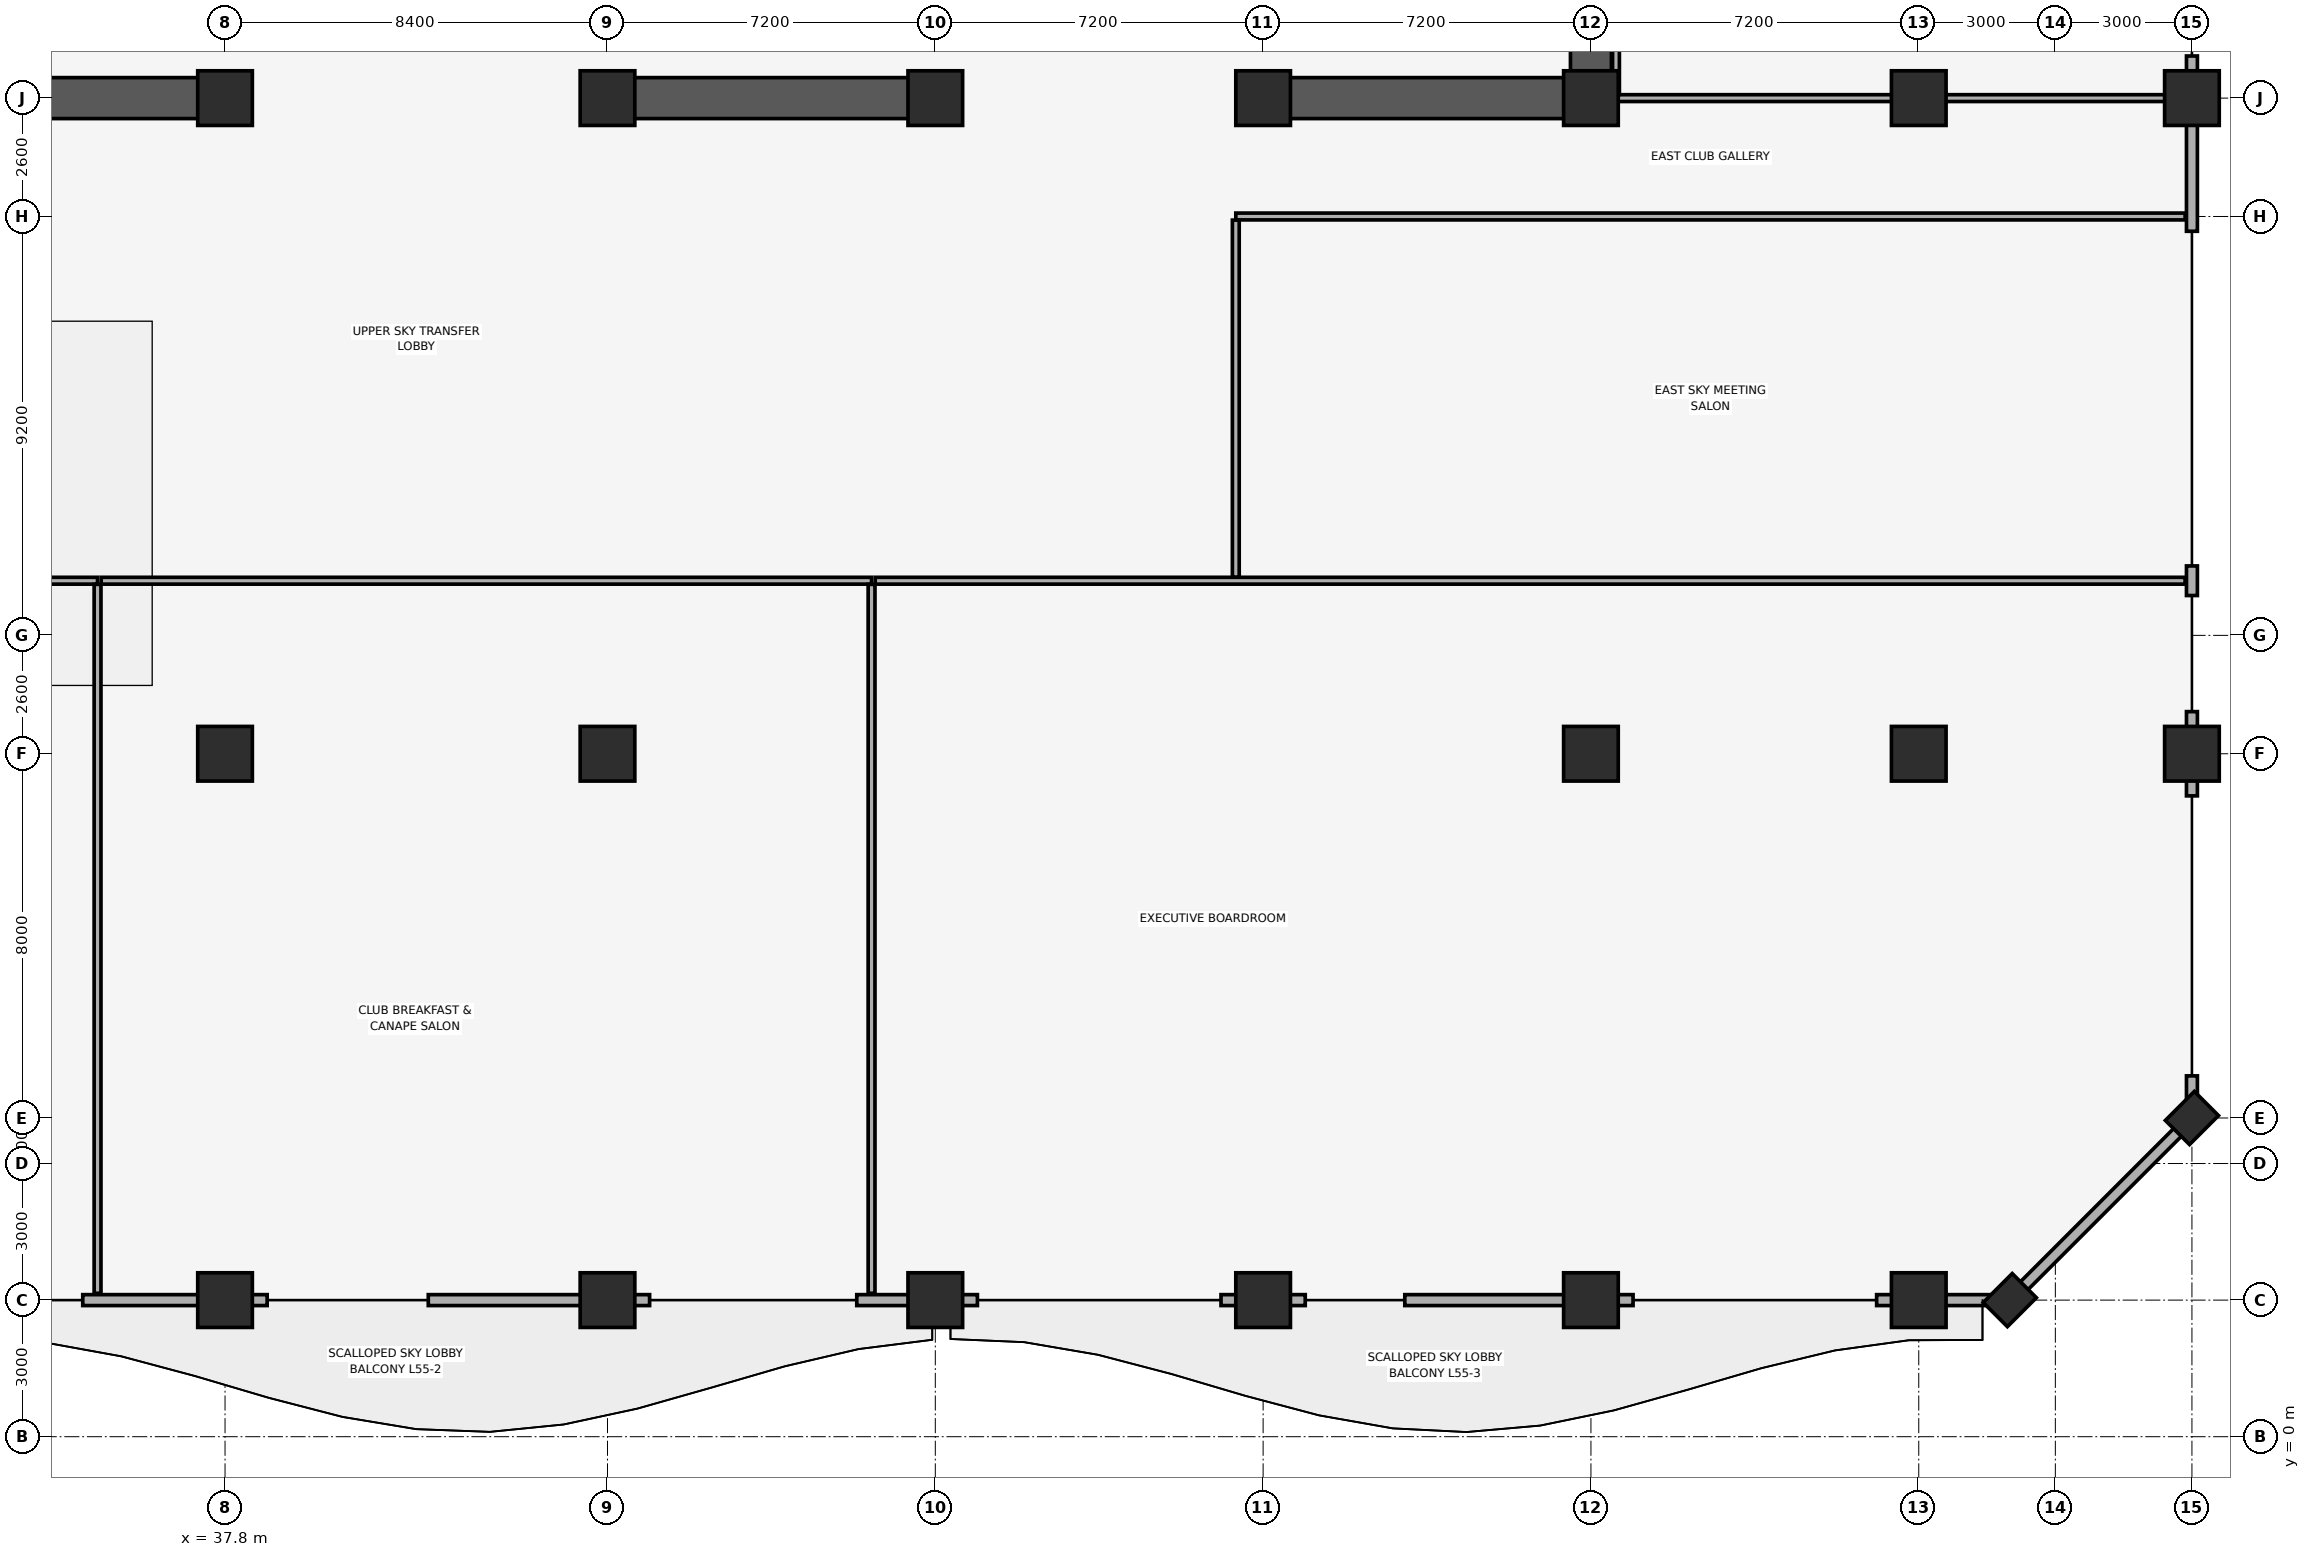
"""IFC4 building model, lengths in metres.
Left out: names, types, materials, properties, quantities, classifications, styles, units other than length and angle.
Written with IfcOpenShell. Run it as: python <this file> out.ifc"""

import sys

from ifc_helpers import new_model, si_unit, direction, frame, frame_2d, origin, origin_2d, place, context, subcontext, project, spatial, rectangle, extrude, element, fill, save


model = new_model("IFC4")
c1 = context("Model", 3, precision=1e-05, world=origin(), true_north=direction((0.0, 1.0)))
c2 = subcontext(c1, "Body", "Model", "MODEL_VIEW")
j1 = project(units=[si_unit("LENGTHUNIT", "METRE"), si_unit("PLANEANGLEUNIT", "RADIAN")], contexts=[c1])
p1 = place(None, origin())
s1 = spatial("IfcSite", under=j1, at=p1, CompositionType="ELEMENT")
p2 = place(p1, origin())
s2 = spatial("IfcBuilding", under=s1, at=p2, CompositionType="ELEMENT")
p3 = place(p2, frame((0.0, 0.0, 224.35)))
s3 = spatial("IfcBuildingStorey", under=s2, at=p3, CompositionType="ELEMENT", Elevation=224.35)
for number, where, z_axis, x_axis in (
    (1, (37.8, 3.0, 0.0), (0.0, 0.0, 1.0), (1.0, 0.0, 0.0)),
    (2, (46.2, 3.0, 0.0), (0.0, 0.0, 1.0), (1.0, 0.0, 0.0)),
    (3, (53.4, 3.0, 0.0), (0.0, 0.0, 1.0), (1.0, 0.0, 0.0)),
    (4, (60.6, 3.0, 0.0), (0.0, 0.0, 1.0), (1.0, 0.0, 0.0)),
    (5, (67.8, 3.0, 0.0), (0.0, 0.0, 1.0), (1.0, 0.0, 0.0)),
    (6, (75.0, 3.0, 0.0), (0.0, 0.0, 1.0), (1.0, 0.0, 0.0)),
    (7, (81.0, 15.0, 0.0), (0.0, 0.0, 1.0), (1.0, 0.0, 0.0)),
    (8, (81.0, 29.4, 0.0), (0.0, 0.0, 1.0), (1.0, 0.0, 0.0)),
):
    element("IfcColumn", number, at=place(p3, frame(where, z_axis=z_axis, x_axis=x_axis)), inside=s3, PredefinedType="COLUMN", context=c2, shape_type="SweptSolid", body=[
        extrude(rectangle(XDim=1.2, YDim=1.2, at=origin_2d()), origin(), (0.0, 0.0, 1.0), 4.56),
    ])
for number, where, z_axis, x_axis in (
    (9, (77.0, 3.0, 0.0), (0.0, 0.0, 1.0), (0.707, 0.707, 0.0)),
    (10, (81.0, 7.0, 0.0), (0.0, 0.0, 1.0), (0.707, 0.707, 0.0)),
):
    element("IfcColumn", number, at=place(p3, frame(where, z_axis=z_axis, x_axis=x_axis)), inside=s3, PredefinedType="PILASTER", context=c2, shape_type="SweptSolid", body=[
        extrude(rectangle(XDim=0.9, YDim=0.75, at=origin_2d()), origin(), (0.0, 0.0, 1.0), 4.56),
    ])
for number, where, z_axis, x_axis in (
    (11, (37.8, 15.0, 0.0), (0.0, 0.0, 1.0), (1.0, 0.0, 0.0)),
    (12, (46.2, 15.0, 0.0), (0.0, 0.0, 1.0), (1.0, 0.0, 0.0)),
    (13, (67.8, 15.0, 0.0), (0.0, 0.0, 1.0), (1.0, 0.0, 0.0)),
    (14, (75.0, 15.0, 0.0), (0.0, 0.0, 1.0), (1.0, 0.0, 0.0)),
    (15, (37.8, 29.4, 0.0), (0.0, 0.0, 1.0), (1.0, 0.0, 0.0)),
    (16, (46.2, 29.4, 0.0), (0.0, 0.0, 1.0), (1.0, 0.0, 0.0)),
    (17, (53.4, 29.4, 0.0), (0.0, 0.0, 1.0), (1.0, 0.0, 0.0)),
    (18, (60.6, 29.4, 0.0), (0.0, 0.0, 1.0), (1.0, 0.0, 0.0)),
    (19, (67.8, 29.4, 0.0), (0.0, 0.0, 1.0), (1.0, 0.0, 0.0)),
    (20, (75.0, 29.4, 0.0), (0.0, 0.0, 1.0), (1.0, 0.0, 0.0)),
):
    element("IfcColumn", number, at=place(p3, frame(where, z_axis=z_axis, x_axis=x_axis)), inside=s3, PredefinedType="COLUMN", context=c2, shape_type="SweptSolid", body=[
        extrude(rectangle(XDim=1.2, YDim=1.2, at=origin_2d()), origin(), (0.0, 0.0, 1.0), 4.56),
    ])
p4 = place(p3, frame((34.675, 3.0, 0.0), z_axis=(0.0, 0.0, 1.0), x_axis=(1.0, 0.0, 0.0)))
e21 = element("IfcWall", 21, at=p4, inside=s3, PredefinedType="SOLIDWALL", context=c2, shape_type="SweptSolid", body=[
    extrude(rectangle(XDim=4.05, YDim=0.24, at=frame_2d((2.025, 0.0))), origin(), (0.0, 0.0, 1.0), 3.4),
])
p5 = place(p3, frame((42.264, 3.0, 0.0), z_axis=(0.0, 0.0, 1.0), x_axis=(1.0, 0.0, 0.0)))
e22 = element("IfcWall", 22, at=p5, inside=s3, PredefinedType="SOLIDWALL", context=c2, shape_type="SweptSolid", body=[
    extrude(rectangle(XDim=4.861, YDim=0.24, at=frame_2d((2.431, 0.0))), origin(), (0.0, 0.0, 1.0), 3.4),
])
p6 = place(p5, frame((0.805, 0.0, 0.0)))
e23 = element("IfcOpeningElement", 23, at=p6, cuts=e22, PredefinedType="OPENING", context=c2, shape_type="SweptSolid", body=[
    extrude(rectangle(XDim=1.1, YDim=2.15, at=frame_2d((0.55, 1.075))), frame((0.0, 0.13, 0.0), z_axis=(0.0, -1.0, 0.0), x_axis=(1.0, 0.0, 0.0)), (0.0, 0.0, 1.0), 0.26),
])
p7 = place(p3, frame((51.675, 3.0, 0.0), z_axis=(0.0, 0.0, 1.0), x_axis=(1.0, 0.0, 0.0)))
e24 = element("IfcWall", 24, at=p7, inside=s3, PredefinedType="SOLIDWALL", context=c2, shape_type="SweptSolid", body=[
    extrude(rectangle(XDim=2.65, YDim=0.24, at=frame_2d((1.325, 0.0))), origin(), (0.0, 0.0, 1.0), 3.4),
])
p8 = place(p3, frame((59.675, 3.0, 0.0), z_axis=(0.0, 0.0, 1.0), x_axis=(1.0, 0.0, 0.0)))
e25 = element("IfcWall", 25, at=p8, inside=s3, PredefinedType="SOLIDWALL", context=c2, shape_type="SweptSolid", body=[
    extrude(rectangle(XDim=1.85, YDim=0.24, at=frame_2d((0.925, 0.0))), origin(), (0.0, 0.0, 1.0), 4.52),
])
p9 = place(p3, frame((63.712, 3.0, 0.0), z_axis=(0.0, 0.0, 1.0), x_axis=(1.0, 0.0, 0.0)))
e26 = element("IfcWall", 26, at=p9, inside=s3, PredefinedType="SOLIDWALL", context=c2, shape_type="SweptSolid", body=[
    extrude(rectangle(XDim=5.013, YDim=0.24, at=frame_2d((2.507, 0.0))), origin(), (0.0, 0.0, 1.0), 3.4),
])
p10 = place(p9, frame((0.805, 0.0, 0.0)))
e27 = element("IfcOpeningElement", 27, at=p10, cuts=e26, PredefinedType="OPENING", context=c2, shape_type="SweptSolid", body=[
    extrude(rectangle(XDim=1.1, YDim=2.15, at=frame_2d((0.55, 1.075))), frame((0.0, 0.13, 0.0), z_axis=(0.0, -1.0, 0.0), x_axis=(1.0, 0.0, 0.0)), (0.0, 0.0, 1.0), 0.26),
])
p11 = place(p3, frame((74.075, 3.0, 0.0), z_axis=(0.0, 0.0, 1.0), x_axis=(1.0, 0.0, 0.0)))
e28 = element("IfcWall", 28, at=p11, inside=s3, PredefinedType="SOLIDWALL", context=c2, shape_type="SweptSolid", body=[
    extrude(rectangle(XDim=2.925, YDim=0.24, at=frame_2d((1.462, 0.0))), origin(), (0.0, 0.0, 1.0), 4.52),
])
p12 = place(p3, frame((77.0, 3.0, 0.0), z_axis=(0.0, 0.0, 1.0), x_axis=(0.707106781187, 0.707106781187, 0.0)))
e29 = element("IfcWall", 29, at=p12, inside=s3, PredefinedType="SOLIDWALL", context=c2, shape_type="SweptSolid", body=[
    extrude(rectangle(XDim=5.657, YDim=0.24, at=frame_2d((2.828, 0.0))), origin(), (0.0, 0.0, 1.0), 4.52),
])
p13 = place(p12, frame((1.778, 0.0, 0.85)))
e30 = element("IfcOpeningElement", 30, at=p13, cuts=e29, PredefinedType="OPENING", context=c2, shape_type="SweptSolid", body=[
    extrude(rectangle(XDim=2.1, YDim=1.6, at=frame_2d((1.05, 0.8))), frame((0.0, 0.13, 0.0), z_axis=(0.0, -1.0, 0.0), x_axis=(1.0, 0.0, 0.0)), (0.0, 0.0, 1.0), 0.26),
])
p14 = place(p3, frame((81.0, 7.0, 0.0), z_axis=(0.0, 0.0, 1.0), x_axis=(0.0, 1.0, 0.0)))
e31 = element("IfcWall", 31, at=p14, inside=s3, PredefinedType="SOLIDWALL", context=c2, shape_type="SweptSolid", body=[
    extrude(rectangle(XDim=0.925, YDim=0.24, at=frame_2d((0.462, 0.0))), origin(), (0.0, 0.0, 1.0), 4.52),
])
p15 = place(p3, frame((81.0, 14.075, 0.0), z_axis=(0.0, 0.0, 1.0), x_axis=(0.0, 1.0, 0.0)))
e32 = element("IfcWall", 32, at=p15, inside=s3, PredefinedType="SOLIDWALL", context=c2, shape_type="SweptSolid", body=[
    extrude(rectangle(XDim=1.85, YDim=0.24, at=frame_2d((0.925, 0.0))), origin(), (0.0, 0.0, 1.0), 4.52),
])
p16 = place(p3, frame((81.0, 18.475, 0.0), z_axis=(0.0, 0.0, 1.0), x_axis=(0.0, 1.0, 0.0)))
e33 = element("IfcWall", 33, at=p16, inside=s3, PredefinedType="SOLIDWALL", context=c2, shape_type="SweptSolid", body=[
    extrude(rectangle(XDim=0.65, YDim=0.24, at=frame_2d((0.325, 0.0))), origin(), (0.0, 0.0, 1.0), 4.52),
])
p17 = place(p3, frame((81.0, 26.475, 0.0), z_axis=(0.0, 0.0, 1.0), x_axis=(0.0, 1.0, 0.0)))
e34 = element("IfcWall", 34, at=p17, inside=s3, PredefinedType="SOLIDWALL", context=c2, shape_type="SweptSolid", body=[
    extrude(rectangle(XDim=3.85, YDim=0.24, at=frame_2d((1.925, 0.0))), origin(), (0.0, 0.0, 1.0), 4.52),
])
p18 = place(p3, frame((67.8, 29.4, 0.0), z_axis=(0.0, 0.0, 1.0), x_axis=(0.0, 1.0, 0.0)))
e35 = element("IfcWall", 35, at=p18, inside=s3, PredefinedType="SHEAR", context=c2, shape_type="SweptSolid", body=[
    extrude(rectangle(XDim=19.2, YDim=0.9, at=frame_2d((9.6, 0.0))), origin(), (0.0, 0.0, 1.0), 4.52),
])
for number, where, z_axis, x_axis in (
    (36, (30.4, 29.4, 0.0), (0.0, 0.0, 1.0), (1.0, 0.0, 0.0)),
    (37, (46.0, 29.4, 0.0), (0.0, 0.0, 1.0), (1.0, 0.0, 0.0)),
):
    element("IfcWall", number, at=place(p3, frame(where, z_axis=z_axis, x_axis=x_axis)), inside=s3, PredefinedType="SHEAR", context=c2, shape_type="SweptSolid", body=[
        extrude(rectangle(XDim=7.6, YDim=0.9, at=frame_2d((3.8, 0.0))), origin(), (0.0, 0.0, 1.0), 4.52),
    ])
p19 = place(p3, frame((60.4, 29.4, 0.0), z_axis=(0.0, 0.0, 1.0), x_axis=(1.0, 0.0, 0.0)))
e38 = element("IfcWall", 38, at=p19, inside=s3, PredefinedType="SHEAR", context=c2, shape_type="SweptSolid", body=[
    extrude(rectangle(XDim=6.945, YDim=0.9, at=frame_2d((3.473, 0.0))), origin(), (0.0, 0.0, 1.0), 4.52),
])
p20 = place(p3, frame((3.15, 18.8, 0.0), z_axis=(0.0, 0.0, 1.0), x_axis=(1.0, 0.0, 0.0)))
e39 = element("IfcWall", 39, at=p20, inside=s3, PredefinedType="PARTITIONING", context=c2, shape_type="SweptSolid", body=[
    extrude(rectangle(XDim=31.85, YDim=0.15, at=frame_2d((15.925, 0.0))), origin(), (0.0, 0.0, 1.0), 4.52),
])
p21 = place(p20, frame((25.1, 0.0, 0.0)))
e40 = element("IfcOpeningElement", 40, at=p21, cuts=e39, PredefinedType="OPENING", context=c2, shape_type="SweptSolid", body=[
    extrude(rectangle(XDim=1.5, YDim=2.25, at=frame_2d((0.75, 1.125))), frame((0.0, 0.085, 0.0), z_axis=(0.0, -1.0, 0.0), x_axis=(1.0, 0.0, 0.0)), (0.0, 0.0, 1.0), 0.17),
])
p22 = place(p3, frame((35.0, 3.15, 0.0), z_axis=(0.0, 0.0, 1.0), x_axis=(0.0, 1.0, 0.0)))
e41 = element("IfcWall", 41, at=p22, inside=s3, PredefinedType="PARTITIONING", context=c2, shape_type="SweptSolid", body=[
    extrude(rectangle(XDim=15.57, YDim=0.15, at=frame_2d((7.785, 0.0))), origin(), (0.0, 0.0, 1.0), 4.52),
])
p23 = place(p3, frame((35.08, 18.8, 0.0), z_axis=(0.0, 0.0, 1.0), x_axis=(1.0, 0.0, 0.0)))
e42 = element("IfcWall", 42, at=p23, inside=s3, PredefinedType="PARTITIONING", context=c2, shape_type="SweptSolid", body=[
    extrude(rectangle(XDim=16.92, YDim=0.15, at=frame_2d((8.46, 0.0))), origin(), (0.0, 0.0, 1.0), 4.52),
])
p24 = place(p23, frame((6.17, 0.0, 0.0)))
e43 = element("IfcOpeningElement", 43, at=p24, cuts=e42, PredefinedType="OPENING", context=c2, shape_type="SweptSolid", body=[
    extrude(rectangle(XDim=1.5, YDim=2.25, at=frame_2d((0.75, 1.125))), frame((0.0, 0.085, 0.0), z_axis=(0.0, -1.0, 0.0), x_axis=(1.0, 0.0, 0.0)), (0.0, 0.0, 1.0), 0.17),
])
p25 = place(p3, frame((52.0, 3.15, 0.0), z_axis=(0.0, 0.0, 1.0), x_axis=(0.0, 1.0, 0.0)))
e44 = element("IfcWall", 44, at=p25, inside=s3, PredefinedType="PARTITIONING", context=c2, shape_type="SweptSolid", body=[
    extrude(rectangle(XDim=15.57, YDim=0.15, at=frame_2d((7.785, 0.0))), origin(), (0.0, 0.0, 1.0), 4.52),
])
p26 = place(p3, frame((52.08, 18.8, 0.0), z_axis=(0.0, 0.0, 1.0), x_axis=(1.0, 0.0, 0.0)))
e45 = element("IfcWall", 45, at=p26, inside=s3, PredefinedType="PARTITIONING", context=c2, shape_type="SweptSolid", body=[
    extrude(rectangle(XDim=28.77, YDim=0.15, at=frame_2d((14.385, 0.0))), origin(), (0.0, 0.0, 1.0), 4.52),
])
p27 = place(p26, frame((2.67, 0.0, 0.0)))
e46 = element("IfcOpeningElement", 46, at=p27, cuts=e45, PredefinedType="OPENING", context=c2, shape_type="SweptSolid", body=[
    extrude(rectangle(XDim=1.5, YDim=2.25, at=frame_2d((0.75, 1.125))), frame((0.0, 0.085, 0.0), z_axis=(0.0, -1.0, 0.0), x_axis=(1.0, 0.0, 0.0)), (0.0, 0.0, 1.0), 0.17),
])
p28 = place(p3, frame((60.0, 26.8, 0.0), z_axis=(0.0, 0.0, 1.0), x_axis=(1.0, 0.0, 0.0)))
e47 = element("IfcWall", 47, at=p28, inside=s3, PredefinedType="PARTITIONING", context=c2, shape_type="SweptSolid", body=[
    extrude(rectangle(XDim=20.85, YDim=0.15, at=frame_2d((10.425, 0.0))), origin(), (0.0, 0.0, 1.0), 4.52),
])
p29 = place(p28, frame((4.5, 0.0, 0.0)))
e48 = element("IfcOpeningElement", 48, at=p29, cuts=e47, PredefinedType="OPENING", context=c2, shape_type="SweptSolid", body=[
    extrude(rectangle(XDim=1.0, YDim=2.15, at=frame_2d((0.5, 1.075))), frame((0.0, 0.085, 0.0), z_axis=(0.0, -1.0, 0.0), x_axis=(1.0, 0.0, 0.0)), (0.0, 0.0, 1.0), 0.17),
])
p30 = place(p3, frame((60.0, 18.88, 0.0), z_axis=(0.0, 0.0, 1.0), x_axis=(0.0, 1.0, 0.0)))
e49 = element("IfcWall", 49, at=p30, inside=s3, PredefinedType="PARTITIONING", context=c2, shape_type="SweptSolid", body=[
    extrude(rectangle(XDim=7.84, YDim=0.15, at=frame_2d((3.92, 0.0))), origin(), (0.0, 0.0, 1.0), 4.52),
])
p31 = place(p3, frame((68.35, 29.4, 0.0), z_axis=(0.0, 0.0, 1.0), x_axis=(1.0, 0.0, 0.0)))
e50 = element("IfcWall", 50, at=p31, inside=s3, PredefinedType="PARTITIONING", context=c2, shape_type="SweptSolid", body=[
    extrude(rectangle(XDim=12.5, YDim=0.15, at=frame_2d((6.25, 0.0))), origin(), (0.0, 0.0, 1.0), 3.4),
])
p32 = place(p31, frame((2.3, 0.0, 0.0)))
e51 = element("IfcOpeningElement", 51, at=p32, cuts=e50, PredefinedType="OPENING", context=c2, shape_type="SweptSolid", body=[
    extrude(rectangle(XDim=1.5, YDim=2.25, at=frame_2d((0.75, 1.125))), frame((0.0, 0.085, 0.0), z_axis=(0.0, -1.0, 0.0), x_axis=(1.0, 0.0, 0.0)), (0.0, 0.0, 1.0), 0.17),
])
p33 = place(p3, frame((68.35, 29.48, 0.0), z_axis=(0.0, 0.0, 1.0), x_axis=(0.0, 1.0, 0.0)))
e52 = element("IfcWall", 52, at=p33, inside=s3, PredefinedType="PARTITIONING", context=c2, shape_type="SweptSolid", body=[
    extrude(rectangle(XDim=19.37, YDim=0.15, at=frame_2d((9.685, 0.0))), origin(), (0.0, 0.0, 1.0), 4.52),
])
p34 = place(p13, origin())
e53 = element("IfcWindow", 53, at=p34, inside=s3, PartitioningType="SINGLE_PANEL", PredefinedType="WINDOW", context=c2, shape_type="SweptSolid", body=[
    extrude(rectangle(XDim=2.1, YDim=1.6, at=frame_2d((1.05, 0.8))), frame((0.0, 0.03, 0.0), z_axis=(0.0, -1.0, 0.0), x_axis=(1.0, 0.0, 0.0)), (0.0, 0.0, 1.0), 0.06),
])
fill(e30, e53)
p35 = place(p6, origin())
e54 = element("IfcDoor", 54, at=p35, inside=s3, OperationType="SINGLE_SWING_LEFT", PredefinedType="DOOR", context=c2, shape_type="SweptSolid", body=[
    extrude(rectangle(XDim=1.1, YDim=2.15, at=frame_2d((0.55, 1.075))), frame((0.0, 0.025, 0.0), z_axis=(0.0, -1.0, 0.0), x_axis=(1.0, 0.0, 0.0)), (0.0, 0.0, 1.0), 0.05),
])
fill(e23, e54)
p36 = place(p10, origin())
e55 = element("IfcDoor", 55, at=p36, inside=s3, OperationType="SINGLE_SWING_RIGHT", PredefinedType="DOOR", context=c2, shape_type="SweptSolid", body=[
    extrude(rectangle(XDim=1.1, YDim=2.15, at=frame_2d((0.55, 1.075))), frame((0.0, 0.025, 0.0), z_axis=(0.0, -1.0, 0.0), x_axis=(1.0, 0.0, 0.0)), (0.0, 0.0, 1.0), 0.05),
])
fill(e27, e55)
p37 = place(p24, origin())
e56 = element("IfcDoor", 56, at=p37, inside=s3, OperationType="DOUBLE_DOOR_SINGLE_SWING", PredefinedType="DOOR", context=c2, shape_type="SweptSolid", body=[
    extrude(rectangle(XDim=1.5, YDim=2.25, at=frame_2d((0.75, 1.125))), frame((0.0, 0.025, 0.0), z_axis=(0.0, -1.0, 0.0), x_axis=(1.0, 0.0, 0.0)), (0.0, 0.0, 1.0), 0.05),
])
fill(e43, e56)
p38 = place(p27, origin())
e57 = element("IfcDoor", 57, at=p38, inside=s3, OperationType="DOUBLE_DOOR_SINGLE_SWING", PredefinedType="DOOR", context=c2, shape_type="SweptSolid", body=[
    extrude(rectangle(XDim=1.5, YDim=2.25, at=frame_2d((0.75, 1.125))), frame((0.0, 0.025, 0.0), z_axis=(0.0, -1.0, 0.0), x_axis=(1.0, 0.0, 0.0)), (0.0, 0.0, 1.0), 0.05),
])
fill(e46, e57)
p39 = place(p29, origin())
e58 = element("IfcDoor", 58, at=p39, inside=s3, OperationType="SINGLE_SWING_RIGHT", PredefinedType="DOOR", context=c2, shape_type="SweptSolid", body=[
    extrude(rectangle(XDim=1.0, YDim=2.15, at=frame_2d((0.5, 1.075))), frame((0.0, 0.025, 0.0), z_axis=(0.0, -1.0, 0.0), x_axis=(1.0, 0.0, 0.0)), (0.0, 0.0, 1.0), 0.05),
])
fill(e48, e58)
p40 = place(p32, origin())
e59 = element("IfcDoor", 59, at=p40, inside=s3, OperationType="DOUBLE_DOOR_SINGLE_SWING", PredefinedType="DOOR", context=c2, shape_type="SweptSolid", body=[
    extrude(rectangle(XDim=1.5, YDim=2.25, at=frame_2d((0.75, 1.125))), frame((0.0, 0.025, 0.0), z_axis=(0.0, -1.0, 0.0), x_axis=(1.0, 0.0, 0.0)), (0.0, 0.0, 1.0), 0.05),
])
fill(e51, e59)
save(model, sys.argv[1])
